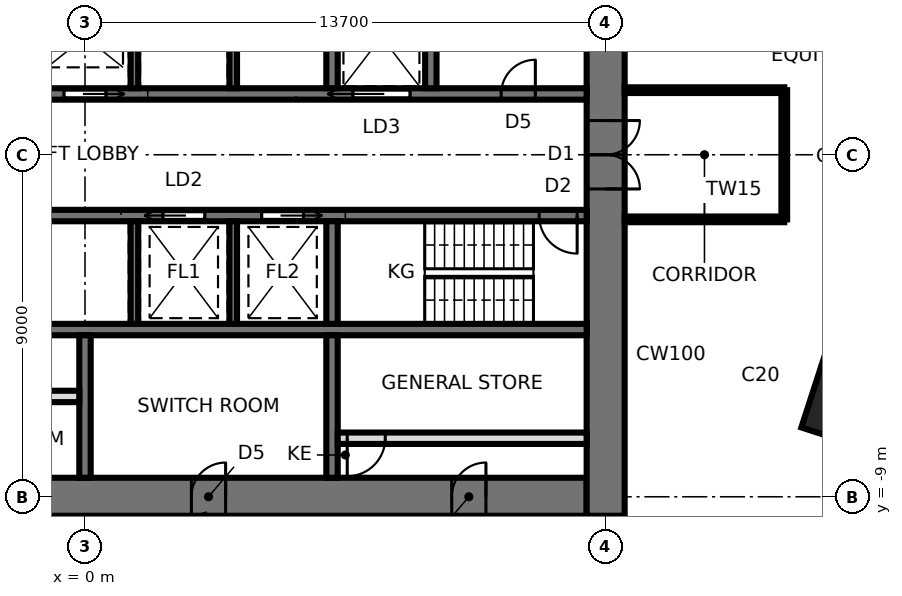
"""IFC4 building model, lengths in metres.
Left out: names, types, materials, properties, quantities, classifications, styles, units other than length and angle.
Written with IfcOpenShell. Run it as: python <this file> out.ifc"""

import sys

from ifc_helpers import new_model, si_unit, direction, frame, frame_2d, origin, origin_2d, place, context, subcontext, project, spatial, rectangle, extrude, element, fill, save


model = new_model("IFC4")
c1 = context("Model", 3, precision=1e-05, world=origin(), true_north=direction((0.0, 1.0)))
c2 = subcontext(c1, "Body", "Model", "MODEL_VIEW")
j1 = project(units=[si_unit("LENGTHUNIT", "METRE"), si_unit("PLANEANGLEUNIT", "RADIAN")], contexts=[c1])
p1 = place(None, origin())
s1 = spatial("IfcSite", under=j1, at=p1, CompositionType="ELEMENT")
p2 = place(p1, origin())
s2 = spatial("IfcBuilding", under=s1, at=p2, CompositionType="ELEMENT")
p3 = place(p2, frame((0.0, 0.0, 23.8)))
s3 = spatial("IfcBuildingStorey", under=s2, at=p3, CompositionType="ELEMENT", Elevation=23.8)
p4 = place(p3, frame((20.109, -6.534, 0.0), z_axis=(0.0, 0.0, 1.0), x_axis=(0.951056516295, -0.309016994375, 0.0)))
e1 = element("IfcColumn", 1, at=p4, inside=s3, PredefinedType="COLUMN", context=c2, shape_type="SweptSolid", body=[
    extrude(rectangle(XDim=2.0, YDim=2.0, at=origin_2d()), origin(), (0.0, 0.0, 1.0), 4.2),
])
p5 = place(p3, frame((-13.2, -9.0, 0.0), z_axis=(0.0, 0.0, 1.0), x_axis=(1.0, 0.0, 0.0)))
e2 = element("IfcWall", 2, at=p5, inside=s3, PredefinedType="SHEAR", context=c2, shape_type="SweptSolid", body=[
    extrude(rectangle(XDim=26.4, YDim=1.0, at=frame_2d((13.2, 0.0))), origin(), (0.0, 0.0, 1.0), 4.2),
])
p6 = place(p5, frame((2.65, 0.0, 0.0)))
e3 = element("IfcOpeningElement", 3, at=p6, cuts=e2, PredefinedType="OPENING", context=c2, shape_type="SweptSolid", body=[
    extrude(rectangle(XDim=0.9, YDim=2.1, at=frame_2d((0.45, 1.05))), frame((0.0, 0.51, 0.0), z_axis=(0.0, -1.0, 0.0), x_axis=(1.0, 0.0, 0.0)), (0.0, 0.0, 1.0), 1.02),
])
p7 = place(p5, frame((9.5, 0.0, 0.0)))
e4 = element("IfcOpeningElement", 4, at=p7, cuts=e2, PredefinedType="OPENING", context=c2, shape_type="SweptSolid", body=[
    extrude(rectangle(XDim=0.9, YDim=2.1, at=frame_2d((0.45, 1.05))), frame((0.0, 0.51, 0.0), z_axis=(0.0, -1.0, 0.0), x_axis=(1.0, 0.0, 0.0)), (0.0, 0.0, 1.0), 1.02),
])
p8 = place(p5, frame((16.0, 0.0, 0.0)))
e5 = element("IfcOpeningElement", 5, at=p8, cuts=e2, PredefinedType="OPENING", context=c2, shape_type="SweptSolid", body=[
    extrude(rectangle(XDim=0.9, YDim=2.1, at=frame_2d((0.45, 1.05))), frame((0.0, 0.51, 0.0), z_axis=(0.0, -1.0, 0.0), x_axis=(1.0, 0.0, 0.0)), (0.0, 0.0, 1.0), 1.02),
])
p9 = place(p5, frame((22.85, 0.0, 0.0)))
e6 = element("IfcOpeningElement", 6, at=p9, cuts=e2, PredefinedType="OPENING", context=c2, shape_type="SweptSolid", body=[
    extrude(rectangle(XDim=0.9, YDim=2.1, at=frame_2d((0.45, 1.05))), frame((0.0, 0.51, 0.0), z_axis=(0.0, -1.0, 0.0), x_axis=(1.0, 0.0, 0.0)), (0.0, 0.0, 1.0), 1.02),
])
p10 = place(p3, frame((13.7, -9.5, 0.0), z_axis=(0.0, 0.0, 1.0), x_axis=(0.0, 1.0, 0.0)))
e7 = element("IfcWall", 7, at=p10, inside=s3, PredefinedType="SHEAR", context=c2, shape_type="SweptSolid", body=[
    extrude(rectangle(XDim=19.0, YDim=1.0, at=frame_2d((9.5, 0.0))), origin(), (0.0, 0.0, 1.0), 4.2),
])
p11 = place(p10, frame((8.6, 0.0, 0.0)))
e8 = element("IfcOpeningElement", 8, at=p11, cuts=e7, PredefinedType="OPENING", context=c2, shape_type="SweptSolid", body=[
    extrude(rectangle(XDim=1.8, YDim=2.4, at=frame_2d((0.9, 1.2))), frame((0.0, 0.51, 0.0), z_axis=(0.0, -1.0, 0.0), x_axis=(1.0, 0.0, 0.0)), (0.0, 0.0, 1.0), 1.02),
])
p12 = place(p3, frame((-13.2, 1.6, 0.0), z_axis=(0.0, 0.0, 1.0), x_axis=(1.0, 0.0, 0.0)))
e9 = element("IfcWall", 9, at=p12, inside=s3, PredefinedType="SHEAR", context=c2, shape_type="SweptSolid", body=[
    extrude(rectangle(XDim=26.4, YDim=0.3, at=frame_2d((13.2, 0.0))), origin(), (0.0, 0.0, 1.0), 4.2),
])
p13 = place(p12, frame((0.25, 0.0, 0.0)))
e10 = element("IfcOpeningElement", 10, at=p13, cuts=e9, PredefinedType="OPENING", context=c2, shape_type="SweptSolid", body=[
    extrude(rectangle(XDim=1.0, YDim=2.1, at=frame_2d((0.5, 1.05))), frame((0.0, 0.16, 0.0), z_axis=(0.0, -1.0, 0.0), x_axis=(1.0, 0.0, 0.0)), (0.0, 0.0, 1.0), 0.32),
])
p14 = place(p12, frame((20.25, 0.0, 0.0)))
e11 = element("IfcOpeningElement", 11, at=p14, cuts=e9, PredefinedType="OPENING", context=c2, shape_type="SweptSolid", body=[
    extrude(rectangle(XDim=1.5, YDim=2.4, at=frame_2d((0.75, 1.2))), frame((0.0, 0.16, 0.0), z_axis=(0.0, -1.0, 0.0), x_axis=(1.0, 0.0, 0.0)), (0.0, 0.0, 1.0), 0.32),
])
p15 = place(p12, frame((7.45, 0.0, 0.0)))
e12 = element("IfcOpeningElement", 12, at=p15, cuts=e9, PredefinedType="OPENING", context=c2, shape_type="SweptSolid", body=[
    extrude(rectangle(XDim=1.1, YDim=2.3, at=frame_2d((0.55, 1.15))), frame((0.0, 0.16, 0.0), z_axis=(0.0, -1.0, 0.0), x_axis=(1.0, 0.0, 0.0)), (0.0, 0.0, 1.0), 0.32),
])
p16 = place(p12, frame((10.05, 0.0, 0.0)))
e13 = element("IfcOpeningElement", 13, at=p16, cuts=e9, PredefinedType="OPENING", context=c2, shape_type="SweptSolid", body=[
    extrude(rectangle(XDim=1.1, YDim=2.3, at=frame_2d((0.55, 1.15))), frame((0.0, 0.16, 0.0), z_axis=(0.0, -1.0, 0.0), x_axis=(1.0, 0.0, 0.0)), (0.0, 0.0, 1.0), 0.32),
])
p17 = place(p12, frame((12.65, 0.0, 0.0)))
e14 = element("IfcOpeningElement", 14, at=p17, cuts=e9, PredefinedType="OPENING", context=c2, shape_type="SweptSolid", body=[
    extrude(rectangle(XDim=1.1, YDim=2.3, at=frame_2d((0.55, 1.15))), frame((0.0, 0.16, 0.0), z_axis=(0.0, -1.0, 0.0), x_axis=(1.0, 0.0, 0.0)), (0.0, 0.0, 1.0), 0.32),
])
p18 = place(p12, frame((24.15, 0.0, 0.0)))
e15 = element("IfcOpeningElement", 15, at=p18, cuts=e9, PredefinedType="OPENING", context=c2, shape_type="SweptSolid", body=[
    extrude(rectangle(XDim=0.9, YDim=2.1, at=frame_2d((0.45, 1.05))), frame((0.0, 0.16, 0.0), z_axis=(0.0, -1.0, 0.0), x_axis=(1.0, 0.0, 0.0)), (0.0, 0.0, 1.0), 0.32),
])
p19 = place(p3, frame((-13.2, -1.6, 0.0), z_axis=(0.0, 0.0, 1.0), x_axis=(1.0, 0.0, 0.0)))
e16 = element("IfcWall", 16, at=p19, inside=s3, PredefinedType="SHEAR", context=c2, shape_type="SweptSolid", body=[
    extrude(rectangle(XDim=26.4, YDim=0.3, at=frame_2d((13.2, 0.0))), origin(), (0.0, 0.0, 1.0), 4.2),
])
p20 = place(p19, frame((25.15, 0.0, 0.0)))
e17 = element("IfcOpeningElement", 17, at=p20, cuts=e16, PredefinedType="OPENING", context=c2, shape_type="SweptSolid", body=[
    extrude(rectangle(XDim=1.0, YDim=2.1, at=frame_2d((0.5, 1.05))), frame((0.0, 0.16, 0.0), z_axis=(0.0, -1.0, 0.0), x_axis=(1.0, 0.0, 0.0)), (0.0, 0.0, 1.0), 0.32),
])
p21 = place(p19, frame((15.25, 0.0, 0.0)))
e18 = element("IfcOpeningElement", 18, at=p21, cuts=e16, PredefinedType="OPENING", context=c2, shape_type="SweptSolid", body=[
    extrude(rectangle(XDim=1.1, YDim=2.3, at=frame_2d((0.55, 1.15))), frame((0.0, 0.16, 0.0), z_axis=(0.0, -1.0, 0.0), x_axis=(1.0, 0.0, 0.0)), (0.0, 0.0, 1.0), 0.32),
])
p22 = place(p19, frame((17.85, 0.0, 0.0)))
e19 = element("IfcOpeningElement", 19, at=p22, cuts=e16, PredefinedType="OPENING", context=c2, shape_type="SweptSolid", body=[
    extrude(rectangle(XDim=1.1, YDim=2.3, at=frame_2d((0.55, 1.15))), frame((0.0, 0.16, 0.0), z_axis=(0.0, -1.0, 0.0), x_axis=(1.0, 0.0, 0.0)), (0.0, 0.0, 1.0), 0.32),
])
p23 = place(p19, frame((5.55, 0.0, 0.0)))
e20 = element("IfcOpeningElement", 20, at=p23, cuts=e16, PredefinedType="OPENING", context=c2, shape_type="SweptSolid", body=[
    extrude(rectangle(XDim=0.9, YDim=2.1, at=frame_2d((0.45, 1.05))), frame((0.0, 0.16, 0.0), z_axis=(0.0, -1.0, 0.0), x_axis=(1.0, 0.0, 0.0)), (0.0, 0.0, 1.0), 0.32),
])
p24 = place(p3, frame((-13.2, -4.6, 0.0), z_axis=(0.0, 0.0, 1.0), x_axis=(1.0, 0.0, 0.0)))
e21 = element("IfcWall", 21, at=p24, inside=s3, PredefinedType="SHEAR", context=c2, shape_type="SweptSolid", body=[
    extrude(rectangle(XDim=26.4, YDim=0.3, at=frame_2d((13.2, 0.0))), origin(), (0.0, 0.0, 1.0), 4.2),
])
p25 = place(p3, frame((6.5, 1.75, 0.0), z_axis=(0.0, 0.0, 1.0), x_axis=(0.0, 1.0, 0.0)))
e22 = element("IfcWall", 22, at=p25, inside=s3, PredefinedType="SHEAR", context=c2, shape_type="SweptSolid", body=[
    extrude(rectangle(XDim=2.7, YDim=0.3, at=frame_2d((1.35, 0.0))), origin(), (0.0, 0.0, 1.0), 4.2),
])
for number, where, z_axis, x_axis in (
    (23, (1.3, 1.75, 0.0), (0.0, 0.0, 1.0), (0.0, 1.0, 0.0)),
    (24, (3.9, 1.75, 0.0), (0.0, 0.0, 1.0), (0.0, 1.0, 0.0)),
):
    element("IfcWall", number, at=place(p3, frame(where, z_axis=z_axis, x_axis=x_axis)), inside=s3, PredefinedType="SHEAR", context=c2, shape_type="SweptSolid", body=[
        extrude(rectangle(XDim=2.7, YDim=0.2, at=frame_2d((1.35, 0.0))), origin(), (0.0, 0.0, 1.0), 4.2),
    ])
p26 = place(p3, frame((6.5, -1.75, 0.0), z_axis=(0.0, 0.0, 1.0), x_axis=(0.0, -1.0, 0.0)))
e25 = element("IfcWall", 25, at=p26, inside=s3, PredefinedType="SHEAR", context=c2, shape_type="SweptSolid", body=[
    extrude(rectangle(XDim=2.7, YDim=0.3, at=frame_2d((1.35, 0.0))), origin(), (0.0, 0.0, 1.0), 4.2),
])
p27 = place(p3, frame((6.5, -4.75, 0.0), z_axis=(0.0, 0.0, 1.0), x_axis=(0.0, -1.0, 0.0)))
e26 = element("IfcWall", 26, at=p27, inside=s3, PredefinedType="SHEAR", context=c2, shape_type="SweptSolid", body=[
    extrude(rectangle(XDim=3.75, YDim=0.3, at=frame_2d((1.875, 0.0))), origin(), (0.0, 0.0, 1.0), 4.2),
])
for number, where, z_axis, x_axis in (
    (27, (1.3, -1.75, 0.0), (0.0, 0.0, 1.0), (0.0, -1.0, 0.0)),
    (28, (3.9, -1.75, 0.0), (0.0, 0.0, 1.0), (0.0, -1.0, 0.0)),
):
    element("IfcWall", number, at=place(p3, frame(where, z_axis=z_axis, x_axis=x_axis)), inside=s3, PredefinedType="SHEAR", context=c2, shape_type="SweptSolid", body=[
        extrude(rectangle(XDim=2.7, YDim=0.2, at=frame_2d((1.35, 0.0))), origin(), (0.0, 0.0, 1.0), 4.2),
    ])
p28 = place(p3, frame((0.0, -4.75, 0.0), z_axis=(0.0, 0.0, 1.0), x_axis=(0.0, -1.0, 0.0)))
e29 = element("IfcWall", 29, at=p28, inside=s3, PredefinedType="SHEAR", context=c2, shape_type="SweptSolid", body=[
    extrude(rectangle(XDim=3.75, YDim=0.3, at=frame_2d((1.875, 0.0))), origin(), (0.0, 0.0, 1.0), 4.2),
])
p29 = place(p3, frame((9.1, 1.75, 0.0), z_axis=(0.0, 0.0, 1.0), x_axis=(0.0, 1.0, 0.0)))
e30 = element("IfcWall", 30, at=p29, inside=s3, PredefinedType="SHEAR", context=c2, shape_type="SweptSolid", body=[
    extrude(rectangle(XDim=2.7, YDim=0.3, at=frame_2d((1.35, 0.0))), origin(), (0.0, 0.0, 1.0), 4.2),
])
p30 = place(p3, frame((-6.35, -6.36, 0.0), z_axis=(0.0, 0.0, 1.0), x_axis=(1.0, 0.0, 0.0)))
e31 = element("IfcWall", 31, at=p30, inside=s3, PredefinedType="PARTITIONING", context=c2, shape_type="SweptSolid", body=[
    extrude(rectangle(XDim=6.2, YDim=0.3, at=frame_2d((3.1, 0.0))), origin(), (0.0, 0.0, 1.0), 4.04),
])
p31 = place(p30, frame((0.25, 0.0, 0.0)))
e32 = element("IfcOpeningElement", 32, at=p31, cuts=e31, PredefinedType="OPENING", context=c2, shape_type="SweptSolid", body=[
    extrude(rectangle(XDim=1.0, YDim=2.4, at=frame_2d((0.5, 1.2))), frame((0.0, 0.16, 0.0), z_axis=(0.0, -1.0, 0.0), x_axis=(1.0, 0.0, 0.0)), (0.0, 0.0, 1.0), 0.32),
])
p32 = place(p3, frame((6.65, -7.46, 0.0), z_axis=(0.0, 0.0, 1.0), x_axis=(1.0, 0.0, 0.0)))
e33 = element("IfcWall", 33, at=p32, inside=s3, PredefinedType="PARTITIONING", context=c2, shape_type="SweptSolid", body=[
    extrude(rectangle(XDim=6.55, YDim=0.3, at=frame_2d((3.275, 0.0))), origin(), (0.0, 0.0, 1.0), 4.04),
])
p33 = place(p32, frame((0.25, 0.0, 0.0)))
e34 = element("IfcOpeningElement", 34, at=p33, cuts=e33, PredefinedType="OPENING", context=c2, shape_type="SweptSolid", body=[
    extrude(rectangle(XDim=1.0, YDim=2.4, at=frame_2d((0.5, 1.2))), frame((0.0, 0.16, 0.0), z_axis=(0.0, -1.0, 0.0), x_axis=(1.0, 0.0, 0.0)), (0.0, 0.0, 1.0), 0.32),
])
p34 = place(p3, frame((3.672, -11.3, 0.0), z_axis=(0.0, 0.0, 1.0), x_axis=(-0.309059822154, 0.95104259964, 0.0)))
e35 = element("IfcWall", 35, at=p34, inside=s3, PredefinedType="PARTITIONING", context=c2, shape_type="SweptSolid", body=[
    extrude(rectangle(XDim=1.893, YDim=0.12, at=frame_2d((0.946, 0.0))), origin(), (0.0, 0.0, 1.0), 2.84),
])
p35 = place(p3, frame((14.2, -1.7, 0.0), z_axis=(0.0, 0.0, 1.0), x_axis=(1.0, 0.0, 0.0)))
e36 = element("IfcWall", 36, at=p35, inside=s3, PredefinedType="PARTITIONING", context=c2, shape_type="SweptSolid", body=[
    extrude(rectangle(XDim=4.2, YDim=0.15, at=frame_2d((2.1, 0.0))), origin(), (0.0, 0.0, 1.0), 4.04),
])
p36 = place(p3, frame((18.4, -1.7, 0.0), z_axis=(0.0, 0.0, 1.0), x_axis=(0.0, 1.0, 0.0)))
e37 = element("IfcWall", 37, at=p36, inside=s3, PredefinedType="PARTITIONING", context=c2, shape_type="SweptSolid", body=[
    extrude(rectangle(XDim=3.4, YDim=0.15, at=frame_2d((1.7, 0.0))), origin(), (0.0, 0.0, 1.0), 4.04),
])
p37 = place(p3, frame((18.4, 1.7, 0.0), z_axis=(0.0, 0.0, 1.0), x_axis=(-1.0, 0.0, 0.0)))
e38 = element("IfcWall", 38, at=p37, inside=s3, PredefinedType="PARTITIONING", context=c2, shape_type="SweptSolid", body=[
    extrude(rectangle(XDim=4.2, YDim=0.15, at=frame_2d((2.1, 0.0))), origin(), (0.0, 0.0, 1.0), 4.04),
])
p38 = place(p11, frame((1.8, 0.0, 0.0), z_axis=(0.0, 0.0, 1.0), x_axis=(-1.0, 0.0, 0.0)))
e39 = element("IfcDoor", 39, at=p38, inside=s3, OperationType="DOUBLE_DOOR_SINGLE_SWING", PredefinedType="DOOR", context=c2, shape_type="SweptSolid", body=[
    extrude(rectangle(XDim=1.72, YDim=2.36, at=frame_2d((0.9, 1.18))), frame((0.0, 0.025, 0.0), z_axis=(0.0, -1.0, 0.0), x_axis=(1.0, 0.0, 0.0)), (0.0, 0.0, 1.0), 0.05),
    extrude(rectangle(XDim=0.04, YDim=2.4, at=frame_2d((1.78, 1.2))), frame((0.0, 0.25, 0.0), z_axis=(0.0, -1.0, 0.0), x_axis=(1.0, 0.0, 0.0)), (0.0, 0.0, 1.0), 0.5),
    extrude(rectangle(XDim=0.04, YDim=2.4, at=frame_2d((0.02, 1.2))), frame((0.0, 0.25, 0.0), z_axis=(0.0, -1.0, 0.0), x_axis=(1.0, 0.0, 0.0)), (0.0, 0.0, 1.0), 0.5),
    extrude(rectangle(XDim=1.72, YDim=0.04, at=frame_2d((0.9, 2.38))), frame((0.0, 0.25, 0.0), z_axis=(0.0, -1.0, 0.0), x_axis=(1.0, 0.0, 0.0)), (0.0, 0.0, 1.0), 0.5),
])
fill(e8, e39)
p39 = place(p20, frame((1.0, 0.0, 0.0), z_axis=(0.0, 0.0, 1.0), x_axis=(-1.0, 0.0, 0.0)))
e40 = element("IfcDoor", 40, at=p39, inside=s3, OperationType="SINGLE_SWING_LEFT", PredefinedType="DOOR", context=c2, shape_type="SweptSolid", body=[
    extrude(rectangle(XDim=1.0, YDim=2.1, at=frame_2d((0.5, 1.05))), frame((0.0, 0.025, 0.0), z_axis=(0.0, -1.0, 0.0), x_axis=(1.0, 0.0, 0.0)), (0.0, 0.0, 1.0), 0.05),
])
fill(e17, e40)
p40 = place(p14, origin())
e41 = element("IfcDoor", 41, at=p40, inside=s3, OperationType="SLIDING_TO_LEFT", PredefinedType="DOOR", context=c2, shape_type="SweptSolid", body=[
    extrude(rectangle(XDim=1.5, YDim=2.4, at=frame_2d((0.75, 1.2))), frame((0.0, 0.025, 0.0), z_axis=(0.0, -1.0, 0.0), x_axis=(1.0, 0.0, 0.0)), (0.0, 0.0, 1.0), 0.05),
])
fill(e11, e41)
p41 = place(p17, origin())
e42 = element("IfcDoor", 42, at=p41, inside=s3, OperationType="SLIDING_TO_RIGHT", PredefinedType="DOOR", context=c2, shape_type="SweptSolid", body=[
    extrude(rectangle(XDim=1.1, YDim=2.3, at=frame_2d((0.55, 1.15))), frame((0.0, 0.025, 0.0), z_axis=(0.0, -1.0, 0.0), x_axis=(1.0, 0.0, 0.0)), (0.0, 0.0, 1.0), 0.05),
])
fill(e14, e42)
p42 = place(p21, frame((1.1, 0.0, 0.0), z_axis=(0.0, 0.0, 1.0), x_axis=(-1.0, 0.0, 0.0)))
e43 = element("IfcDoor", 43, at=p42, inside=s3, OperationType="SLIDING_TO_RIGHT", PredefinedType="DOOR", context=c2, shape_type="SweptSolid", body=[
    extrude(rectangle(XDim=1.1, YDim=2.3, at=frame_2d((0.55, 1.15))), frame((0.0, 0.025, 0.0), z_axis=(0.0, -1.0, 0.0), x_axis=(1.0, 0.0, 0.0)), (0.0, 0.0, 1.0), 0.05),
])
fill(e18, e43)
p43 = place(p22, frame((1.1, 0.0, 0.0), z_axis=(0.0, 0.0, 1.0), x_axis=(-1.0, 0.0, 0.0)))
e44 = element("IfcDoor", 44, at=p43, inside=s3, OperationType="SLIDING_TO_LEFT", PredefinedType="DOOR", context=c2, shape_type="SweptSolid", body=[
    extrude(rectangle(XDim=1.1, YDim=2.3, at=frame_2d((0.55, 1.15))), frame((0.0, 0.025, 0.0), z_axis=(0.0, -1.0, 0.0), x_axis=(1.0, 0.0, 0.0)), (0.0, 0.0, 1.0), 0.05),
])
fill(e19, e44)
p44 = place(p18, origin())
e45 = element("IfcDoor", 45, at=p44, inside=s3, OperationType="SINGLE_SWING_RIGHT", PredefinedType="DOOR", context=c2, shape_type="SweptSolid", body=[
    extrude(rectangle(XDim=0.9, YDim=2.1, at=frame_2d((0.45, 1.05))), frame((0.0, 0.025, 0.0), z_axis=(0.0, -1.0, 0.0), x_axis=(1.0, 0.0, 0.0)), (0.0, 0.0, 1.0), 0.05),
])
fill(e15, e45)
p45 = place(p8, origin())
e46 = element("IfcDoor", 46, at=p45, inside=s3, OperationType="SINGLE_SWING_RIGHT", PredefinedType="DOOR", context=c2, shape_type="SweptSolid", body=[
    extrude(rectangle(XDim=0.82, YDim=2.06, at=frame_2d((0.45, 1.03))), frame((0.0, 0.025, 0.0), z_axis=(0.0, -1.0, 0.0), x_axis=(1.0, 0.0, 0.0)), (0.0, 0.0, 1.0), 0.05),
    extrude(rectangle(XDim=0.04, YDim=2.1, at=frame_2d((0.02, 1.05))), frame((0.0, 0.25, 0.0), z_axis=(0.0, -1.0, 0.0), x_axis=(1.0, 0.0, 0.0)), (0.0, 0.0, 1.0), 0.5),
    extrude(rectangle(XDim=0.04, YDim=2.1, at=frame_2d((0.88, 1.05))), frame((0.0, 0.25, 0.0), z_axis=(0.0, -1.0, 0.0), x_axis=(1.0, 0.0, 0.0)), (0.0, 0.0, 1.0), 0.5),
    extrude(rectangle(XDim=0.82, YDim=0.04, at=frame_2d((0.45, 2.08))), frame((0.0, 0.25, 0.0), z_axis=(0.0, -1.0, 0.0), x_axis=(1.0, 0.0, 0.0)), (0.0, 0.0, 1.0), 0.5),
])
fill(e5, e46)
p46 = place(p9, origin())
e47 = element("IfcDoor", 47, at=p46, inside=s3, OperationType="SINGLE_SWING_RIGHT", PredefinedType="DOOR", context=c2, shape_type="SweptSolid", body=[
    extrude(rectangle(XDim=0.82, YDim=2.06, at=frame_2d((0.45, 1.03))), frame((0.0, 0.025, 0.0), z_axis=(0.0, -1.0, 0.0), x_axis=(1.0, 0.0, 0.0)), (0.0, 0.0, 1.0), 0.05),
    extrude(rectangle(XDim=0.04, YDim=2.1, at=frame_2d((0.02, 1.05))), frame((0.0, 0.25, 0.0), z_axis=(0.0, -1.0, 0.0), x_axis=(1.0, 0.0, 0.0)), (0.0, 0.0, 1.0), 0.5),
    extrude(rectangle(XDim=0.04, YDim=2.1, at=frame_2d((0.88, 1.05))), frame((0.0, 0.25, 0.0), z_axis=(0.0, -1.0, 0.0), x_axis=(1.0, 0.0, 0.0)), (0.0, 0.0, 1.0), 0.5),
    extrude(rectangle(XDim=0.82, YDim=0.04, at=frame_2d((0.45, 2.08))), frame((0.0, 0.25, 0.0), z_axis=(0.0, -1.0, 0.0), x_axis=(1.0, 0.0, 0.0)), (0.0, 0.0, 1.0), 0.5),
])
fill(e6, e47)
p47 = place(p33, frame((1.0, 0.0, 0.0), z_axis=(0.0, 0.0, 1.0), x_axis=(-1.0, 0.0, 0.0)))
e48 = element("IfcDoor", 48, at=p47, inside=s3, OperationType="SINGLE_SWING_RIGHT", PredefinedType="DOOR", context=c2, shape_type="SweptSolid", body=[
    extrude(rectangle(XDim=1.0, YDim=2.4, at=frame_2d((0.5, 1.2))), frame((0.0, 0.025, 0.0), z_axis=(0.0, -1.0, 0.0), x_axis=(1.0, 0.0, 0.0)), (0.0, 0.0, 1.0), 0.05),
])
fill(e34, e48)
save(model, sys.argv[1])
